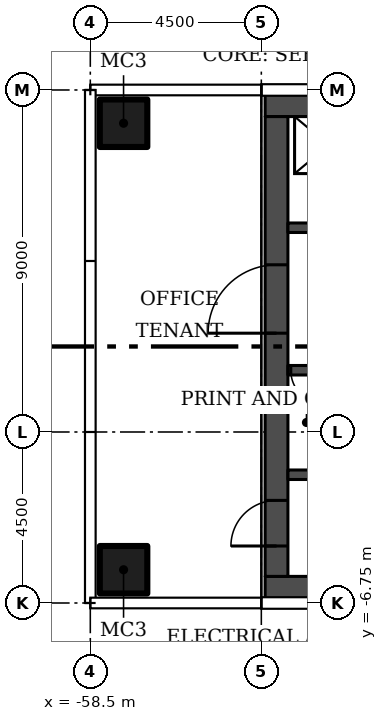
"""IFC4 building model, lengths in metres.
Left out: names, types, materials, properties, quantities, classifications, styles, units other than length and angle.
Written with IfcOpenShell. Run it as: python <this file> out.ifc"""

import sys

from ifc_helpers import new_model, si_unit, direction, frame, frame_2d, origin, origin_2d, place, context, subcontext, project, spatial, rectangle, hollow_rectangle, extrude, element, fill, save


model = new_model("IFC4")
c1 = context("Model", 3, precision=1e-05, world=origin(), true_north=direction((0.0, 1.0)))
c2 = subcontext(c1, "Body", "Model", "MODEL_VIEW")
j1 = project(units=[si_unit("LENGTHUNIT", "METRE"), si_unit("PLANEANGLEUNIT", "RADIAN")], contexts=[c1])
p1 = place(None, origin())
s1 = spatial("IfcSite", under=j1, at=p1, CompositionType="ELEMENT")
p2 = place(p1, origin())
s2 = spatial("IfcBuilding", under=s1, at=p2, CompositionType="ELEMENT")
p3 = place(p2, frame((0.0, 0.0, 120.9)))
s3 = spatial("IfcBuildingStorey", under=s2, at=p3, CompositionType="ELEMENT", Elevation=120.9)
for number, where in (
    (1, (-57.625, -5.875, 0.0)),
    (2, (-57.625, 5.875, 0.0)),
):
    element("IfcColumn", number, at=place(p3, frame(where)), inside=s3, PredefinedType="COLUMN", context=c2, shape_type="SweptSolid", body=[
        extrude(hollow_rectangle(XDim=1.25, YDim=1.25, WallThickness=0.05, at=origin_2d()), origin(), (0.0, 0.0, 1.0), 3.55),
    ])
for number, where, z_axis, x_axis in (
    (3, (-40.6, -6.35, 0.0), (0.0, 0.0, 1.0), (-1.0, 0.0, 0.0)),
    (4, (-40.6, 6.35, 0.0), (0.0, 0.0, 1.0), (-1.0, 0.0, 0.0)),
):
    element("IfcWall", number, at=place(p3, frame(where, z_axis=z_axis, x_axis=x_axis)), inside=s3, PredefinedType="SHEAR", context=c2, shape_type="SweptSolid", body=[
        extrude(rectangle(XDim=13.3, YDim=0.6, at=frame_2d((6.65, 0.0))), origin(), (0.0, 0.0, 1.0), 3.55),
    ])
p4 = place(p3, frame((-53.6, -6.05, 0.0), z_axis=(0.0, 0.0, 1.0), x_axis=(0.0, 1.0, 0.0)))
e5 = element("IfcWall", 5, at=p4, inside=s3, PredefinedType="SHEAR", context=c2, shape_type="SweptSolid", body=[
    extrude(rectangle(XDim=12.1, YDim=0.6, at=frame_2d((6.05, 0.0))), origin(), (0.0, 0.0, 1.0), 3.55),
])
p5 = place(p4, frame((0.8, 0.0, 0.0)))
e6 = element("IfcOpeningElement", 6, at=p5, cuts=e5, PredefinedType="OPENING", context=c2, shape_type="SweptSolid", body=[
    extrude(rectangle(XDim=1.2, YDim=2.1, at=frame_2d((0.6, 1.05))), frame((0.0, 0.31, 0.0), z_axis=(0.0, -1.0, 0.0), x_axis=(1.0, 0.0, 0.0)), (0.0, 0.0, 1.0), 0.62),
])
p6 = place(p4, frame((6.4, 0.0, 0.0)))
e7 = element("IfcOpeningElement", 7, at=p6, cuts=e5, PredefinedType="OPENING", context=c2, shape_type="SweptSolid", body=[
    extrude(rectangle(XDim=1.8, YDim=2.4, at=frame_2d((0.9, 1.2))), frame((0.0, 0.31, 0.0), z_axis=(0.0, -1.0, 0.0), x_axis=(1.0, 0.0, 0.0)), (0.0, 0.0, 1.0), 0.62),
])
p7 = place(p3, frame((-41.2, -3.375, 0.0), z_axis=(0.0, 0.0, 1.0), x_axis=(-1.0, 0.0, 0.0)))
e8 = element("IfcWall", 8, at=p7, inside=s3, PredefinedType="SHEAR", context=c2, shape_type="SweptSolid", body=[
    extrude(rectangle(XDim=12.1, YDim=0.25, at=frame_2d((6.05, 0.0))), origin(), (0.0, 0.0, 1.0), 3.55),
])
p8 = place(p7, frame((0.05, 0.0, 0.0)))
e9 = element("IfcOpeningElement", 9, at=p8, cuts=e8, PredefinedType="OPENING", context=c2, shape_type="SweptSolid", body=[
    extrude(rectangle(XDim=1.1, YDim=2.1, at=frame_2d((0.55, 1.05))), frame((0.0, 0.135, 0.0), z_axis=(0.0, -1.0, 0.0), x_axis=(1.0, 0.0, 0.0)), (0.0, 0.0, 1.0), 0.27),
])
p9 = place(p3, frame((-41.2, -0.625, 0.0), z_axis=(0.0, 0.0, 1.0), x_axis=(-1.0, 0.0, 0.0)))
e10 = element("IfcWall", 10, at=p9, inside=s3, PredefinedType="SHEAR", context=c2, shape_type="SweptSolid", body=[
    extrude(rectangle(XDim=12.1, YDim=0.25, at=frame_2d((6.05, 0.0))), origin(), (0.0, 0.0, 1.0), 3.55),
])
p10 = place(p9, frame((2.25, 0.0, 0.0)))
e11 = element("IfcOpeningElement", 11, at=p10, cuts=e10, PredefinedType="OPENING", context=c2, shape_type="SweptSolid", body=[
    extrude(rectangle(XDim=1.2, YDim=2.1, at=frame_2d((0.6, 1.05))), frame((0.0, 0.135, 0.0), z_axis=(0.0, -1.0, 0.0), x_axis=(1.0, 0.0, 0.0)), (0.0, 0.0, 1.0), 0.27),
])
p11 = place(p9, frame((9.5, 0.0, 0.0)))
e12 = element("IfcOpeningElement", 12, at=p11, cuts=e10, PredefinedType="OPENING", context=c2, shape_type="SweptSolid", body=[
    extrude(rectangle(XDim=0.9, YDim=2.1, at=frame_2d((0.45, 1.05))), frame((0.0, 0.135, 0.0), z_axis=(0.0, -1.0, 0.0), x_axis=(1.0, 0.0, 0.0)), (0.0, 0.0, 1.0), 0.27),
])
p12 = place(p9, frame((11.125, 0.0, 0.0)))
e13 = element("IfcOpeningElement", 13, at=p12, cuts=e10, PredefinedType="OPENING", context=c2, shape_type="SweptSolid", body=[
    extrude(rectangle(XDim=0.9, YDim=2.1, at=frame_2d((0.45, 1.05))), frame((0.0, 0.135, 0.0), z_axis=(0.0, -1.0, 0.0), x_axis=(1.0, 0.0, 0.0)), (0.0, 0.0, 1.0), 0.27),
])
p13 = place(p3, frame((-48.5, 3.125, 0.0), z_axis=(0.0, 0.0, 1.0), x_axis=(-1.0, 0.0, 0.0)))
e14 = element("IfcWall", 14, at=p13, inside=s3, PredefinedType="SHEAR", context=c2, shape_type="SweptSolid", body=[
    extrude(rectangle(XDim=4.8, YDim=0.25, at=frame_2d((2.4, 0.0))), origin(), (0.0, 0.0, 1.0), 3.55),
])
p14 = place(p13, frame((0.775, 0.0, 0.0)))
e15 = element("IfcOpeningElement", 15, at=p14, cuts=e14, PredefinedType="OPENING", context=c2, shape_type="SweptSolid", body=[
    extrude(rectangle(XDim=1.1, YDim=2.1, at=frame_2d((0.55, 1.05))), frame((0.0, 0.135, 0.0), z_axis=(0.0, -1.0, 0.0), x_axis=(1.0, 0.0, 0.0)), (0.0, 0.0, 1.0), 0.27),
])
p15 = place(p5, origin())
e16 = element("IfcDoor", 16, at=p15, inside=s3, OperationType="SINGLE_SWING_LEFT", PredefinedType="DOOR", context=c2, shape_type="SweptSolid", body=[
    extrude(rectangle(XDim=1.2, YDim=2.1, at=frame_2d((0.6, 1.05))), frame((0.0, 0.025, 0.0), z_axis=(0.0, -1.0, 0.0), x_axis=(1.0, 0.0, 0.0)), (0.0, 0.0, 1.0), 0.05),
])
fill(e6, e16)
p16 = place(p6, origin())
e17 = element("IfcDoor", 17, at=p16, inside=s3, OperationType="DOUBLE_DOOR_SINGLE_SWING", PredefinedType="DOOR", context=c2, shape_type="SweptSolid", body=[
    extrude(rectangle(XDim=1.8, YDim=2.4, at=frame_2d((0.9, 1.2))), frame((0.0, 0.025, 0.0), z_axis=(0.0, -1.0, 0.0), x_axis=(1.0, 0.0, 0.0)), (0.0, 0.0, 1.0), 0.05),
])
fill(e7, e17)
p17 = place(p12, origin())
e18 = element("IfcDoor", 18, at=p17, inside=s3, OperationType="SINGLE_SWING_RIGHT", PredefinedType="DOOR", context=c2, shape_type="SweptSolid", body=[
    extrude(rectangle(XDim=0.9, YDim=2.1, at=frame_2d((0.45, 1.05))), frame((0.0, 0.025, 0.0), z_axis=(0.0, -1.0, 0.0), x_axis=(1.0, 0.0, 0.0)), (0.0, 0.0, 1.0), 0.05),
])
fill(e13, e18)
save(model, sys.argv[1])
